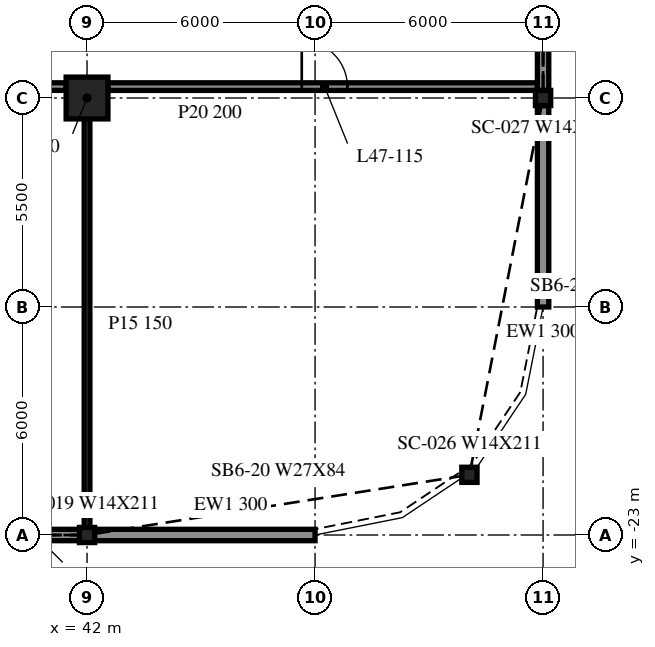
"""IFC4 building model, lengths in metres.
Left out: names, types, materials, properties, quantities, classifications, styles, units other than length and angle.
Written with IfcOpenShell. Run it as: python <this file> out.ifc"""

import sys

from ifc_helpers import new_model, si_unit, direction, frame, frame_2d, origin, origin_2d, place, context, subcontext, project, spatial, rectangle, i_section, extrude, element, fill, save


model = new_model("IFC4")
c1 = context("Model", 3, precision=1e-05, world=origin(), true_north=direction((0.0, 1.0)))
c2 = subcontext(c1, "Body", "Model", "MODEL_VIEW")
j1 = project(units=[si_unit("LENGTHUNIT", "METRE"), si_unit("PLANEANGLEUNIT", "RADIAN")], contexts=[c1])
p1 = place(None, origin())
s1 = spatial("IfcSite", under=j1, at=p1, CompositionType="ELEMENT")
p2 = place(p1, origin())
s2 = spatial("IfcBuilding", under=s1, at=p2, CompositionType="ELEMENT")
p3 = place(p2, frame((0.0, 0.0, 197.7)))
s3 = spatial("IfcBuildingStorey", under=s2, at=p3, CompositionType="ELEMENT", Elevation=197.7)
p4 = place(p3, frame((42.0, -11.5, -0.34), z_axis=(0.0, 0.0, 1.0), x_axis=(1.0, 0.0, 0.0)))
e1 = element("IfcColumn", 1, at=p4, inside=s3, PredefinedType="COLUMN", context=c2, shape_type="SweptSolid", body=[
    extrude(rectangle(XDim=1.1, YDim=1.1, at=origin_2d()), origin(), (0.0, 0.0, 1.0), 3.8),
])
for number, where, z_axis, x_axis in (
    (2, (42.0, -23.0, -0.34), (0.0, 0.0, 1.0), (1.0, 0.0, 0.0)),
    (3, (52.062, -21.416, -0.34), (0.0, 0.0, 1.0), (1.0, 0.0, 0.0)),
    (4, (54.0, -11.5, -0.34), (0.0, 0.0, 1.0), (1.0, 0.0, 0.0)),
):
    element("IfcColumn", number, at=place(p3, frame(where, z_axis=z_axis, x_axis=x_axis)), inside=s3, PredefinedType="COLUMN", context=c2, shape_type="SweptSolid", body=[
        extrude(i_section(OverallWidth=0.401, OverallDepth=0.399, WebThickness=0.025, FlangeThickness=0.04, at=origin_2d()), origin(), (0.0, 0.0, 1.0), 3.8),
    ])
p5 = place(p3, frame((30.012, -23.0, 0.0), z_axis=(0.0, 0.0, 1.0), x_axis=(1.0, 0.0, 0.0)))
e5 = element("IfcWall", 5, at=p5, inside=s3, PredefinedType="NOTDEFINED", context=c2, shape_type="SweptSolid", body=[
    extrude(rectangle(XDim=11.975, YDim=0.3, at=frame_2d((5.988, 0.0))), origin(), (0.0, 0.0, 1.0), 2.782),
])
p6 = place(p3, frame((42.012, -23.0, 0.0), z_axis=(0.0, 0.0, 1.0), x_axis=(1.0, 0.0, 0.0)))
e6 = element("IfcWall", 6, at=p6, inside=s3, PredefinedType="NOTDEFINED", context=c2, shape_type="SweptSolid", body=[
    extrude(rectangle(XDim=5.988, YDim=0.3, at=frame_2d((2.994, 0.0))), origin(), (0.0, 0.0, 1.0), 2.782),
])
p7 = place(p3, frame((54.0, -17.0, 0.0), z_axis=(0.0, 0.0, 1.0), x_axis=(0.0, 1.0, 0.0)))
e7 = element("IfcWall", 7, at=p7, inside=s3, PredefinedType="NOTDEFINED", context=c2, shape_type="SweptSolid", body=[
    extrude(rectangle(XDim=5.3, YDim=0.3, at=frame_2d((2.65, 0.0))), origin(), (0.0, 0.0, 1.0), 2.782),
])
p8 = place(p3, frame((54.0, -11.3, 0.0), z_axis=(0.0, 0.0, 1.0), x_axis=(0.0, 1.0, 0.0)))
e8 = element("IfcWall", 8, at=p8, inside=s3, PredefinedType="NOTDEFINED", context=c2, shape_type="SweptSolid", body=[
    extrude(rectangle(XDim=11.1, YDim=0.3, at=frame_2d((5.55, 0.0))), origin(), (0.0, 0.0, 1.0), 2.782),
])
p9 = place(p3, frame((30.55, -11.2, 0.0), z_axis=(0.0, 0.0, 1.0), x_axis=(1.0, 0.0, 0.0)))
e9 = element("IfcWall", 9, at=p9, inside=s3, PredefinedType="PARTITIONING", context=c2, shape_type="SweptSolid", body=[
    extrude(rectangle(XDim=10.9, YDim=0.2, at=frame_2d((5.45, 0.0))), origin(), (0.0, 0.0, 1.0), 3.46),
])
p10 = place(p9, frame((4.1, 0.0, 0.0)))
e10 = element("IfcOpeningElement", 10, at=p10, cuts=e9, PredefinedType="OPENING", context=c2, shape_type="SweptSolid", body=[
    extrude(rectangle(XDim=1.0, YDim=2.1, at=frame_2d((0.5, 1.05))), frame((0.0, 0.11, 0.0), z_axis=(0.0, -1.0, 0.0), x_axis=(1.0, 0.0, 0.0)), (0.0, 0.0, 1.0), 0.22),
])
p11 = place(p9, frame((5.7, 0.0, 0.0)))
e11 = element("IfcOpeningElement", 11, at=p11, cuts=e9, PredefinedType="OPENING", context=c2, shape_type="SweptSolid", body=[
    extrude(rectangle(XDim=1.0, YDim=2.1, at=frame_2d((0.5, 1.05))), frame((0.0, 0.11, 0.0), z_axis=(0.0, -1.0, 0.0), x_axis=(1.0, 0.0, 0.0)), (0.0, 0.0, 1.0), 0.22),
])
p12 = place(p3, frame((42.55, -11.2, 0.0), z_axis=(0.0, 0.0, 1.0), x_axis=(1.0, 0.0, 0.0)))
e12 = element("IfcWall", 12, at=p12, inside=s3, PredefinedType="PARTITIONING", context=c2, shape_type="SweptSolid", body=[
    extrude(rectangle(XDim=11.3, YDim=0.2, at=frame_2d((5.65, 0.0))), origin(), (0.0, 0.0, 1.0), 3.46),
])
p13 = place(p12, frame((5.1, 0.0, 0.0)))
e13 = element("IfcOpeningElement", 13, at=p13, cuts=e12, PredefinedType="OPENING", context=c2, shape_type="SweptSolid", body=[
    extrude(rectangle(XDim=1.2, YDim=2.1, at=frame_2d((0.6, 1.05))), frame((0.0, 0.11, 0.0), z_axis=(0.0, -1.0, 0.0), x_axis=(1.0, 0.0, 0.0)), (0.0, 0.0, 1.0), 0.22),
])
p14 = place(p3, frame((42.0, -22.85, 0.0), z_axis=(0.0, 0.0, 1.0), x_axis=(0.0, 1.0, 0.0)))
e14 = element("IfcWall", 14, at=p14, inside=s3, PredefinedType="PARTITIONING", context=c2, shape_type="SweptSolid", body=[
    extrude(rectangle(XDim=10.8, YDim=0.15, at=frame_2d((5.4, 0.0))), origin(), (0.0, 0.0, 1.0), 3.46),
])
p15 = place(p13, origin())
e15 = element("IfcDoor", 15, at=p15, inside=s3, OperationType="SINGLE_SWING_LEFT", PredefinedType="DOOR", context=c2, shape_type="SweptSolid", body=[
    extrude(rectangle(XDim=1.2, YDim=2.1, at=frame_2d((0.6, 1.05))), frame((0.0, 0.025, 0.0), z_axis=(0.0, -1.0, 0.0), x_axis=(1.0, 0.0, 0.0)), (0.0, 0.0, 1.0), 0.05),
])
fill(e13, e15)
save(model, sys.argv[1])
